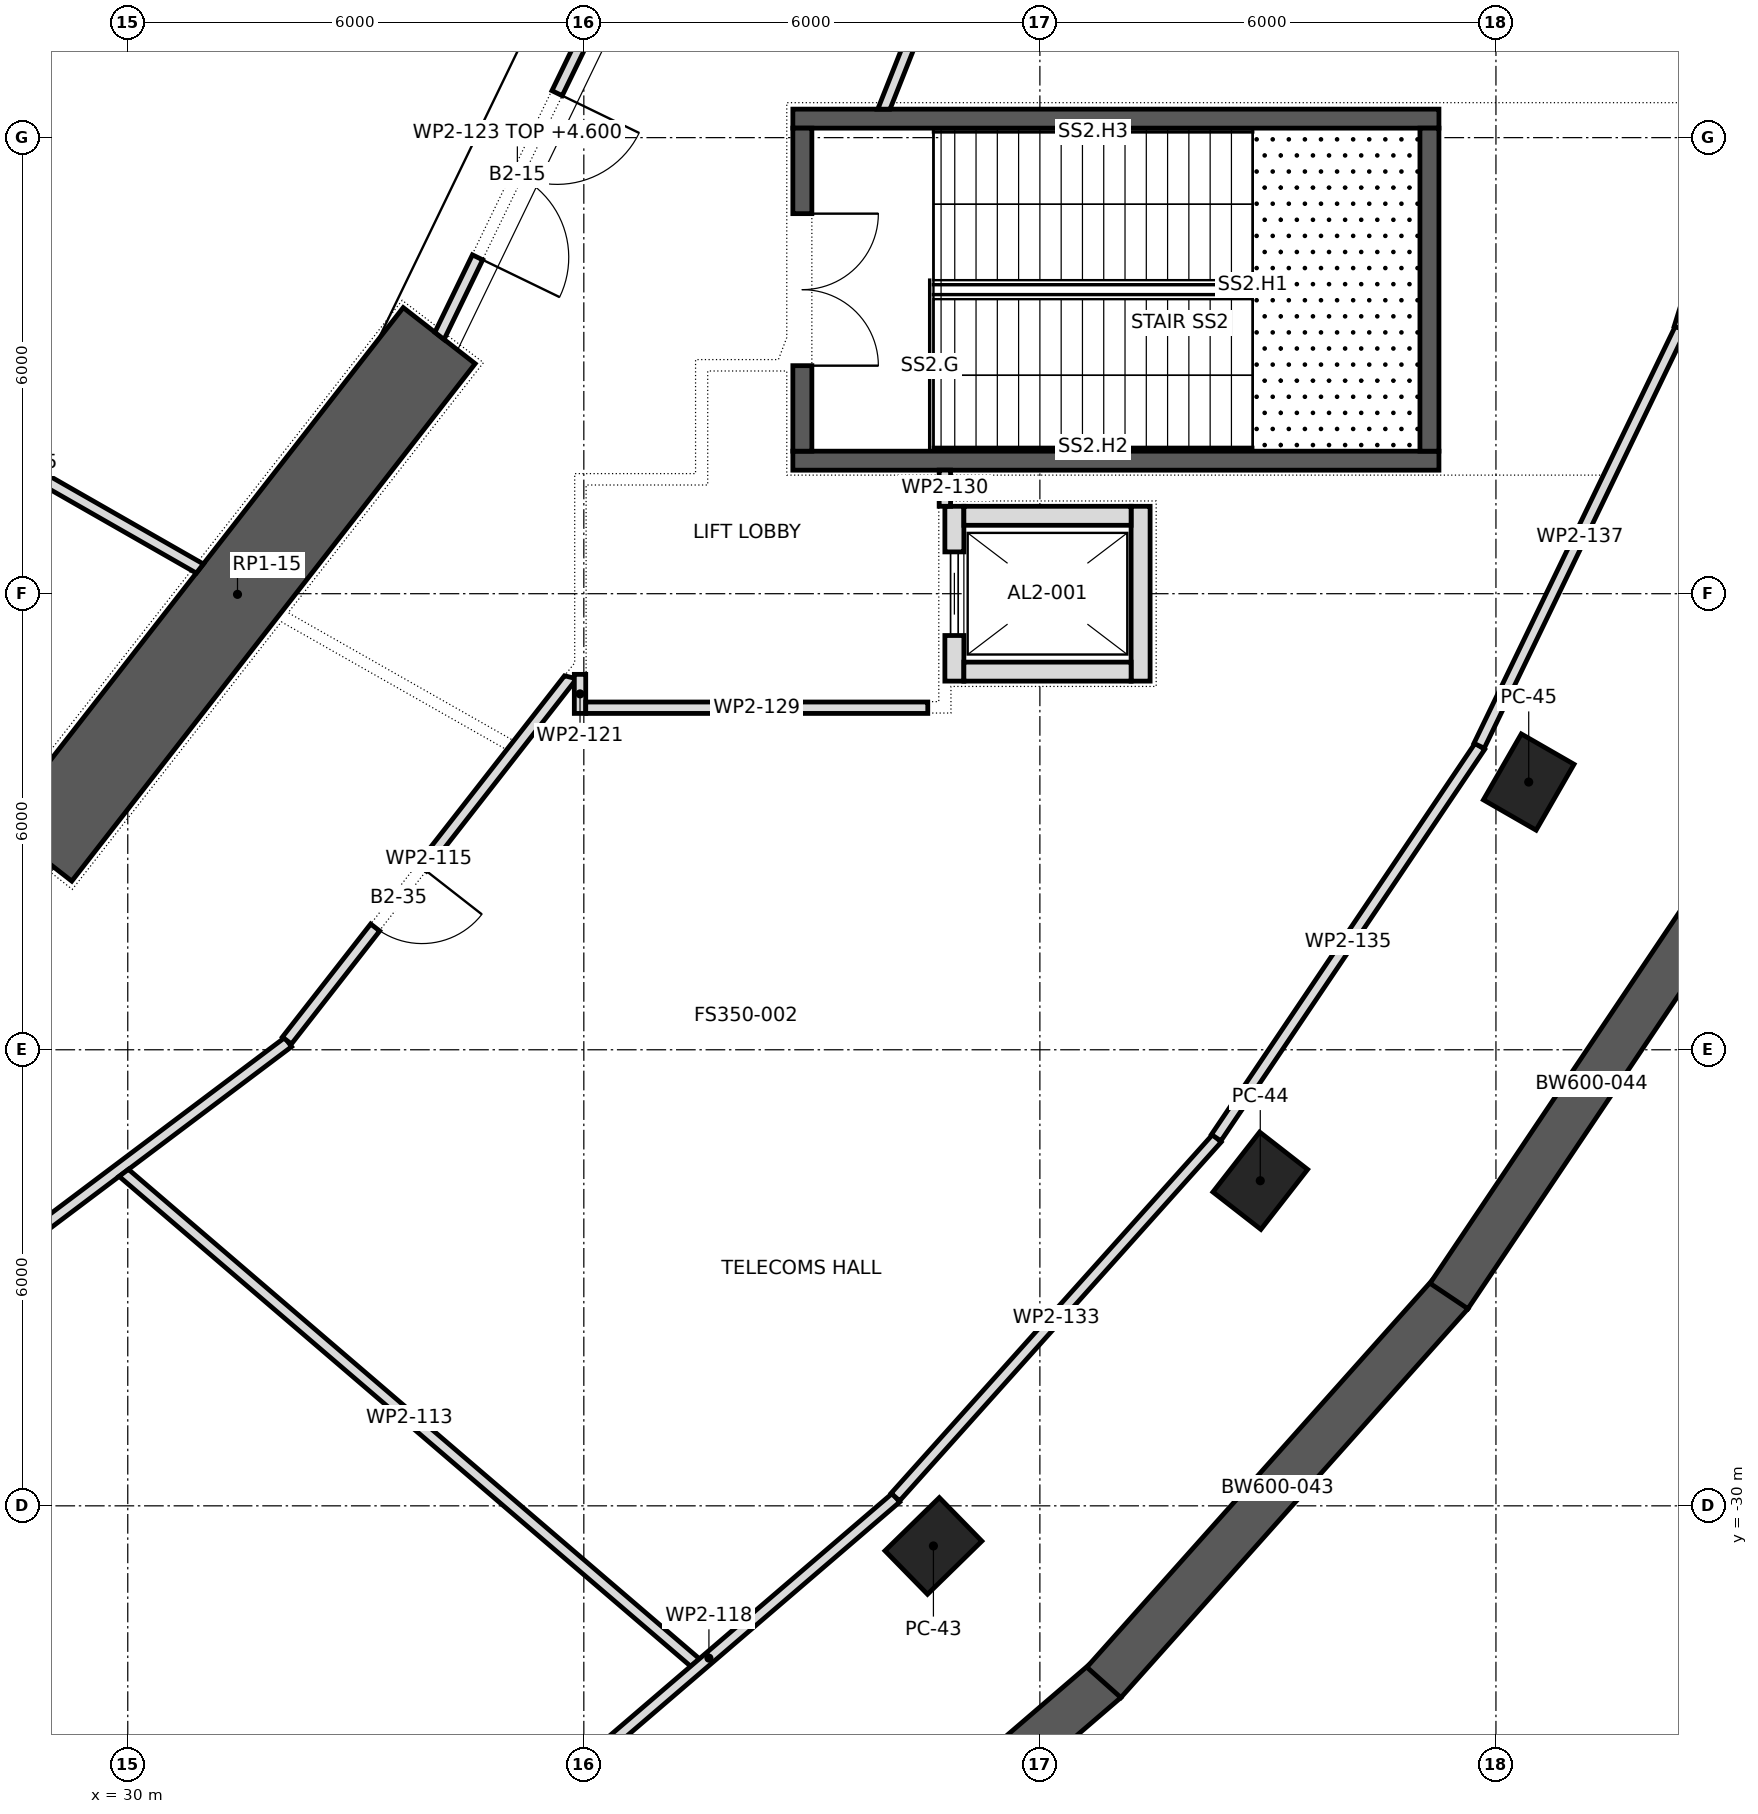
"""IFC4 building model, lengths in metres.
Left out: names, types, materials, properties, quantities, classifications, styles, units other than length and angle.
Written with IfcOpenShell. Run it as: python <this file> out.ifc"""

import sys

from ifc_helpers import new_model, si_unit, direction, frame, frame_2d, origin, origin_2d, place, context, subcontext, project, spatial, polyline, rectangle, outline, extrude, element, fill, save


model = new_model("IFC4")
c1 = context("Model", 3, precision=1e-05, world=origin(), true_north=direction((0.0, 1.0)))
c2 = subcontext(c1, "Body", "Model", "MODEL_VIEW")
j1 = project(units=[si_unit("LENGTHUNIT", "METRE"), si_unit("PLANEANGLEUNIT", "RADIAN")], contexts=[c1])
p1 = place(None, origin())
s1 = spatial("IfcSite", under=j1, at=p1, CompositionType="ELEMENT")
p2 = place(p1, origin())
s2 = spatial("IfcBuilding", under=s1, at=p2, CompositionType="ELEMENT")
p3 = place(p2, frame((0.0, 0.0, -9.5)))
s3 = spatial("IfcBuildingStorey", under=s2, at=p3, CompositionType="ELEMENT", Elevation=-9.5)
for number, where, z_axis, x_axis in (
    (1, (40.599, -30.528, 0.0), (0.0, 0.0, 1.0), (0.715, 0.699, 0.0)),
    (2, (44.899, -25.723, 0.0), (0.0, 0.0, 1.0), (0.615, 0.789, 0.0)),
    (3, (48.431, -20.478, 0.0), (0.0, 0.0, 1.0), (0.499, 0.867, 0.0)),
):
    element("IfcColumn", number, at=place(p3, frame(where, z_axis=z_axis, x_axis=x_axis)), inside=s3, PredefinedType="COLUMN", context=c2, shape_type="SweptSolid", body=[
        extrude(rectangle(XDim=1.0, YDim=0.8, at=origin_2d()), origin(), (0.0, 0.0, 1.0), 5.5),
    ])
p4 = place(p3, frame((28.79, -21.412, 0.0), z_axis=(0.0, 0.0, 1.0), x_axis=(0.614825322247, 0.788663314174, 0.0)))
e4 = element("IfcWall", 4, at=p4, inside=s3, PredefinedType="SHEAR", context=c2, shape_type="SweptSolid", body=[
    extrude(rectangle(XDim=8.632, YDim=1.2, at=frame_2d((4.316, 0.0))), origin(), (0.0, 0.0, 1.0), 5.5),
])
p5 = place(p3, frame((37.568, -36.853, 0.0), z_axis=(0.0, 0.0, 1.0), x_axis=(0.758319142722, 0.65188348482, 0.0)))
e5 = element("IfcWall", 5, at=p5, inside=s3, PredefinedType="SOLIDWALL", context=c2, shape_type="SweptSolid", body=[
    extrude(rectangle(XDim=6.991, YDim=0.6, at=frame_2d((3.496, 0.0))), origin(), (0.0, 0.0, 1.0), 5.5),
])
p6 = place(p3, frame((42.842, -32.323, 0.0), z_axis=(0.0, 0.0, 1.0), x_axis=(0.665894053378, 0.74604631872, 0.0)))
e6 = element("IfcWall", 6, at=p6, inside=s3, PredefinedType="SOLIDWALL", context=c2, shape_type="SweptSolid", body=[
    extrude(rectangle(XDim=6.856, YDim=0.6, at=frame_2d((3.428, 0.0))), origin(), (0.0, 0.0, 1.0), 5.5),
])
p7 = place(p3, frame((47.382, -27.24, 0.0), z_axis=(0.0, 0.0, 1.0), x_axis=(0.557518861869, 0.830164272093, 0.0)))
e7 = element("IfcWall", 7, at=p7, inside=s3, PredefinedType="SOLIDWALL", context=c2, shape_type="SweptSolid", body=[
    extrude(rectangle(XDim=6.729, YDim=0.6, at=frame_2d((3.364, 0.0))), origin(), (0.0, 0.0, 1.0), 5.5),
])
for number, where, z_axis, x_axis in (
    (8, (38.75, -11.75, 0.0), (0.0, 0.0, 1.0), (1.0, 0.0, 0.0)),
    (9, (38.75, -16.25, 0.0), (0.0, 0.0, 1.0), (1.0, 0.0, 0.0)),
):
    element("IfcWall", number, at=place(p3, frame(where, z_axis=z_axis, x_axis=x_axis)), inside=s3, PredefinedType="SHEAR", context=c2, shape_type="SweptSolid", body=[
        extrude(rectangle(XDim=8.5, YDim=0.25, at=frame_2d((4.25, 0.0))), origin(), (0.0, 0.0, 1.0), 5.05),
    ])
p8 = place(p3, frame((38.875, -16.125, 0.0), z_axis=(0.0, 0.0, 1.0), x_axis=(0.0, 1.0, 0.0)))
e10 = element("IfcWall", 10, at=p8, inside=s3, PredefinedType="SHEAR", context=c2, shape_type="SweptSolid", body=[
    extrude(rectangle(XDim=4.25, YDim=0.25, at=frame_2d((2.125, 0.0))), origin(), (0.0, 0.0, 1.0), 5.05),
])
p9 = place(p8, frame((1.125, 0.0, 0.0)))
e11 = element("IfcOpeningElement", 11, at=p9, cuts=e10, PredefinedType="OPENING", context=c2, shape_type="SweptSolid", body=[
    extrude(rectangle(XDim=2.0, YDim=2.1, at=frame_2d((1.0, 1.05))), frame((0.0, 0.137, 0.0), z_axis=(0.0, -1.0, 0.0), x_axis=(1.0, 0.0, 0.0)), (0.0, 0.0, 1.0), 0.274),
])
p10 = place(p3, frame((47.125, -16.125, 0.0), z_axis=(0.0, 0.0, 1.0), x_axis=(0.0, 1.0, 0.0)))
e12 = element("IfcWall", 12, at=p10, inside=s3, PredefinedType="SHEAR", context=c2, shape_type="SweptSolid", body=[
    extrude(rectangle(XDim=4.25, YDim=0.25, at=frame_2d((2.125, 0.0))), origin(), (0.0, 0.0, 1.0), 5.05),
])
p11 = place(p3, frame((40.875, -19.15, 0.0), z_axis=(0.0, 0.0, 1.0), x_axis=(0.0, 1.0, 0.0)))
e13 = element("IfcWall", 13, at=p11, inside=s3, PredefinedType="PARTITIONING", context=c2, shape_type="SweptSolid", body=[
    extrude(rectangle(XDim=2.3, YDim=0.25, at=frame_2d((1.15, 0.0))), origin(), (0.0, 0.0, 1.0), 5.05),
])
p12 = place(p11, frame((0.6, 0.0, 0.0)))
e14 = element("IfcOpeningElement", 14, at=p12, cuts=e13, PredefinedType="OPENING", context=c2, shape_type="SweptSolid", body=[
    extrude(rectangle(XDim=1.1, YDim=2.1, at=frame_2d((0.55, 1.05))), frame((0.0, 0.137, 0.0), z_axis=(0.0, -1.0, 0.0), x_axis=(1.0, 0.0, 0.0)), (0.0, 0.0, 1.0), 0.274),
])
p13 = place(p3, frame((43.325, -19.15, 0.0), z_axis=(0.0, 0.0, 1.0), x_axis=(0.0, 1.0, 0.0)))
e15 = element("IfcWall", 15, at=p13, inside=s3, PredefinedType="PARTITIONING", context=c2, shape_type="SweptSolid", body=[
    extrude(rectangle(XDim=2.3, YDim=0.25, at=frame_2d((1.15, 0.0))), origin(), (0.0, 0.0, 1.0), 5.05),
])
for number, where, z_axis, x_axis in (
    (16, (41.0, -16.975, 0.0), (0.0, 0.0, 1.0), (1.0, 0.0, 0.0)),
    (17, (41.0, -19.025, 0.0), (0.0, 0.0, 1.0), (1.0, 0.0, 0.0)),
):
    element("IfcWall", number, at=place(p3, frame(where, z_axis=z_axis, x_axis=x_axis)), inside=s3, PredefinedType="PARTITIONING", context=c2, shape_type="SweptSolid", body=[
        extrude(rectangle(XDim=2.2, YDim=0.25, at=frame_2d((1.1, 0.0))), origin(), (0.0, 0.0, 1.0), 5.05),
    ])
p14 = place(p3, frame((23.696, -30.228, 0.0), z_axis=(0.0, 0.0, 1.0), x_axis=(0.799195100787, 0.601071701944, 0.0)))
e18 = element("IfcWall", 18, at=p14, inside=s3, PredefinedType="PARTITIONING", context=c2, shape_type="SweptSolid", body=[
    extrude(rectangle(XDim=10.529, YDim=0.15, at=frame_2d((5.264, 0.0))), origin(), (0.0, 0.0, 1.0), 5.05),
])
p15 = place(p3, frame((26.074, -14.882, 0.0), z_axis=(0.0, 0.0, 1.0), x_axis=(0.868133416031, -0.496330909746, 0.0)))
e19 = element("IfcWall", 19, at=p15, inside=s3, PredefinedType="PARTITIONING", context=c2, shape_type="SweptSolid", body=[
    extrude(outline(polyline([(0.0, -0.075), (5.604, -0.075), (5.626, 0.075), (0.0, 0.075), (0.0, -0.075)])), origin(), (0.0, 0.0, 1.0), 5.05),
])
p16 = place(p3, frame((29.947, -25.619, 0.0), z_axis=(0.0, 0.0, 1.0), x_axis=(0.759265306208, -0.650781218836, 0.0)))
e20 = element("IfcWall", 20, at=p16, inside=s3, PredefinedType="PARTITIONING", context=c2, shape_type="SweptSolid", body=[
    extrude(outline(polyline([(-0.017, -0.075), (9.888, -0.075), (9.911, 0.075), (0.017, 0.075), (-0.017, -0.075)])), origin(), (0.0, 0.0, 1.0), 5.05),
])
p17 = place(p3, frame((32.094, -23.878, 0.0), z_axis=(0.0, 0.0, 1.0), x_axis=(0.615450256232, 0.788175730472, 0.0)))
e21 = element("IfcWall", 21, at=p17, inside=s3, PredefinedType="PARTITIONING", context=c2, shape_type="SweptSolid", body=[
    extrude(outline(polyline([(0.0, -0.075), (6.097, -0.075), (6.03, 0.075), (0.0, 0.075), (0.0, -0.075)])), origin(), (0.0, 0.0, 1.0), 5.05),
])
p18 = place(p17, frame((1.887, 0.0, 0.0)))
e22 = element("IfcOpeningElement", 22, at=p18, cuts=e21, PredefinedType="OPENING", context=c2, shape_type="SweptSolid", body=[
    extrude(rectangle(XDim=1.0, YDim=2.1, at=frame_2d((0.5, 1.05))), frame((0.0, 0.087, 0.0), z_axis=(0.0, -1.0, 0.0), x_axis=(1.0, 0.0, 0.0)), (0.0, 0.0, 1.0), 0.174),
])
p19 = place(p3, frame((35.185, -34.114, 0.0), z_axis=(0.0, 0.0, 1.0), x_axis=(0.759033312601, 0.651051787773, 0.0)))
e23 = element("IfcWall", 23, at=p19, inside=s3, PredefinedType="PARTITIONING", context=c2, shape_type="SweptSolid", body=[
    extrude(rectangle(XDim=6.484, YDim=0.15, at=frame_2d((3.242, 0.0))), origin(), (0.0, 0.0, 1.0), 5.05),
])
p20 = place(p3, frame((35.95, -19.575, 0.0), z_axis=(0.0, 0.0, 1.0), x_axis=(0.0, 1.0, 0.0)))
e24 = element("IfcWall", 24, at=p20, inside=s3, PredefinedType="PARTITIONING", context=c2, shape_type="SweptSolid", body=[
    extrude(rectangle(XDim=0.514, YDim=0.15, at=frame_2d((0.257, 0.0))), origin(), (0.0, 0.0, 1.0), 5.05),
])
p21 = place(p3, frame((36.15, -10.38, 0.0), z_axis=(0.0, 0.0, 1.0), x_axis=(-0.436102687495, -0.899896908518, 0.0)))
e25 = element("IfcWall", 25, at=p21, inside=s3, PredefinedType="PARTITIONING", context=c2, shape_type="SweptSolid", body=[
    extrude(outline(polyline([(0.017, -0.075), (4.683, -0.075), (4.715, 0.075), (-0.017, 0.075), (0.017, -0.075)])), origin(), (0.0, 0.0, 1.0), 4.6),
])
p22 = place(p21, frame((1.15, 0.0, 0.0)))
e26 = element("IfcOpeningElement", 26, at=p22, cuts=e25, PredefinedType="OPENING", context=c2, shape_type="SweptSolid", body=[
    extrude(rectangle(XDim=2.4, YDim=2.1, at=frame_2d((1.2, 1.05))), frame((0.0, 0.087, 0.0), z_axis=(0.0, -1.0, 0.0), x_axis=(1.0, 0.0, 0.0)), (0.0, 0.0, 1.0), 0.174),
])
p23 = place(p3, frame((39.948, -11.625, 0.0), z_axis=(0.0, 0.0, 1.0), x_axis=(0.368047556164, 0.92980696728, 0.0)))
e27 = element("IfcWall", 27, at=p23, inside=s3, PredefinedType="PARTITIONING", context=c2, shape_type="SweptSolid", body=[
    extrude(outline(polyline([(0.03, -0.075), (4.914, -0.075), (4.914, 0.075), (-0.03, 0.075), (0.03, -0.075)])), origin(), (0.0, 0.0, 1.0), 5.05),
])
p24 = place(p3, frame((40.525, -19.5, 0.0), z_axis=(0.0, 0.0, 1.0), x_axis=(-1.0, 0.0, 0.0)))
e28 = element("IfcWall", 28, at=p24, inside=s3, PredefinedType="PARTITIONING", context=c2, shape_type="SweptSolid", body=[
    extrude(rectangle(XDim=4.5, YDim=0.15, at=frame_2d((2.25, 0.0))), origin(), (0.0, 0.0, 1.0), 5.05),
])
p25 = place(p3, frame((40.75, -16.374, 0.0), z_axis=(0.0, 0.0, 1.0), x_axis=(0.0, -1.0, 0.0)))
e29 = element("IfcWall", 29, at=p25, inside=s3, PredefinedType="PARTITIONING", context=c2, shape_type="SweptSolid", body=[
    extrude(rectangle(XDim=0.476, YDim=0.15, at=frame_2d((0.238, 0.0))), origin(), (0.0, 0.0, 1.0), 5.05),
])
p26 = place(p3, frame((44.329, -25.165, 0.0), z_axis=(0.0, 0.0, 1.0), x_axis=(-0.6673947824, -0.744704105283, 0.0)))
e30 = element("IfcWall", 30, at=p26, inside=s3, PredefinedType="PARTITIONING", context=c2, shape_type="SweptSolid", body=[
    extrude(rectangle(XDim=6.338, YDim=0.15, at=frame_2d((3.169, 0.0))), origin(), (0.0, 0.0, 1.0), 5.05),
])
p27 = place(p3, frame((47.789, -20.007, 0.0), z_axis=(0.0, 0.0, 1.0), x_axis=(-0.558812320082, -0.829294152231, 0.0)))
e31 = element("IfcWall", 31, at=p27, inside=s3, PredefinedType="PARTITIONING", context=c2, shape_type="SweptSolid", body=[
    extrude(rectangle(XDim=6.21, YDim=0.15, at=frame_2d((3.105, 0.0))), origin(), (0.0, 0.0, 1.0), 5.05),
])
p28 = place(p3, frame((50.428, -14.511, 0.0), z_axis=(0.0, 0.0, 1.0), x_axis=(-0.434690826011, -0.900579749818, 0.0)))
e32 = element("IfcWall", 32, at=p28, inside=s3, PredefinedType="PARTITIONING", context=c2, shape_type="SweptSolid", body=[
    extrude(rectangle(XDim=6.096, YDim=0.15, at=frame_2d((3.048, 0.0))), origin(), (0.0, 0.0, 1.0), 5.05),
])
p29 = place(p3, frame((50.416, -14.506, 0.0), z_axis=(0.0, 0.0, 1.0), x_axis=(0.297713123711, 0.954655380737, 0.0)))
e33 = element("IfcWall", 33, at=p29, inside=s3, PredefinedType="PARTITIONING", context=c2, shape_type="SweptSolid", body=[
    extrude(rectangle(XDim=6.013, YDim=0.15, at=frame_2d((3.006, 0.0))), origin(), (0.0, 0.0, 1.0), 5.05),
])
p30 = place(p12, origin())
e34 = element("IfcDoor", 34, at=p30, inside=s3, OperationType="SLIDING_TO_LEFT", PredefinedType="DOOR", context=c2, shape_type="SweptSolid", body=[
    extrude(rectangle(XDim=1.1, YDim=2.1, at=frame_2d((0.55, 1.05))), frame((0.0, 0.025, 0.0), z_axis=(0.0, -1.0, 0.0), x_axis=(1.0, 0.0, 0.0)), (0.0, 0.0, 1.0), 0.05),
])
fill(e14, e34)
p31 = place(p9, frame((2.0, 0.0, 0.0), z_axis=(0.0, 0.0, 1.0), x_axis=(-1.0, 0.0, 0.0)))
e35 = element("IfcDoor", 35, at=p31, inside=s3, OperationType="DOUBLE_DOOR_SINGLE_SWING", PredefinedType="DOOR", context=c2, shape_type="SweptSolid", body=[
    extrude(rectangle(XDim=2.0, YDim=2.1, at=frame_2d((1.0, 1.05))), frame((0.0, 0.025, 0.0), z_axis=(0.0, -1.0, 0.0), x_axis=(1.0, 0.0, 0.0)), (0.0, 0.0, 1.0), 0.05),
])
fill(e11, e35)
p32 = place(p22, origin())
e36 = element("IfcDoor", 36, at=p32, inside=s3, OperationType="DOUBLE_DOOR_SINGLE_SWING", PredefinedType="DOOR", context=c2, shape_type="SweptSolid", body=[
    extrude(rectangle(XDim=2.4, YDim=2.1, at=frame_2d((1.2, 1.05))), frame((0.0, 0.025, 0.0), z_axis=(0.0, -1.0, 0.0), x_axis=(1.0, 0.0, 0.0)), (0.0, 0.0, 1.0), 0.05),
])
fill(e26, e36)
p33 = place(p18, frame((1.0, 0.0, 0.0), z_axis=(0.0, 0.0, 1.0), x_axis=(-1.0, 0.0, 0.0)))
e37 = element("IfcDoor", 37, at=p33, inside=s3, OperationType="SINGLE_SWING_RIGHT", PredefinedType="DOOR", context=c2, shape_type="SweptSolid", body=[
    extrude(rectangle(XDim=1.0, YDim=2.1, at=frame_2d((0.5, 1.05))), frame((0.0, 0.025, 0.0), z_axis=(0.0, -1.0, 0.0), x_axis=(1.0, 0.0, 0.0)), (0.0, 0.0, 1.0), 0.05),
])
fill(e22, e37)
save(model, sys.argv[1])
